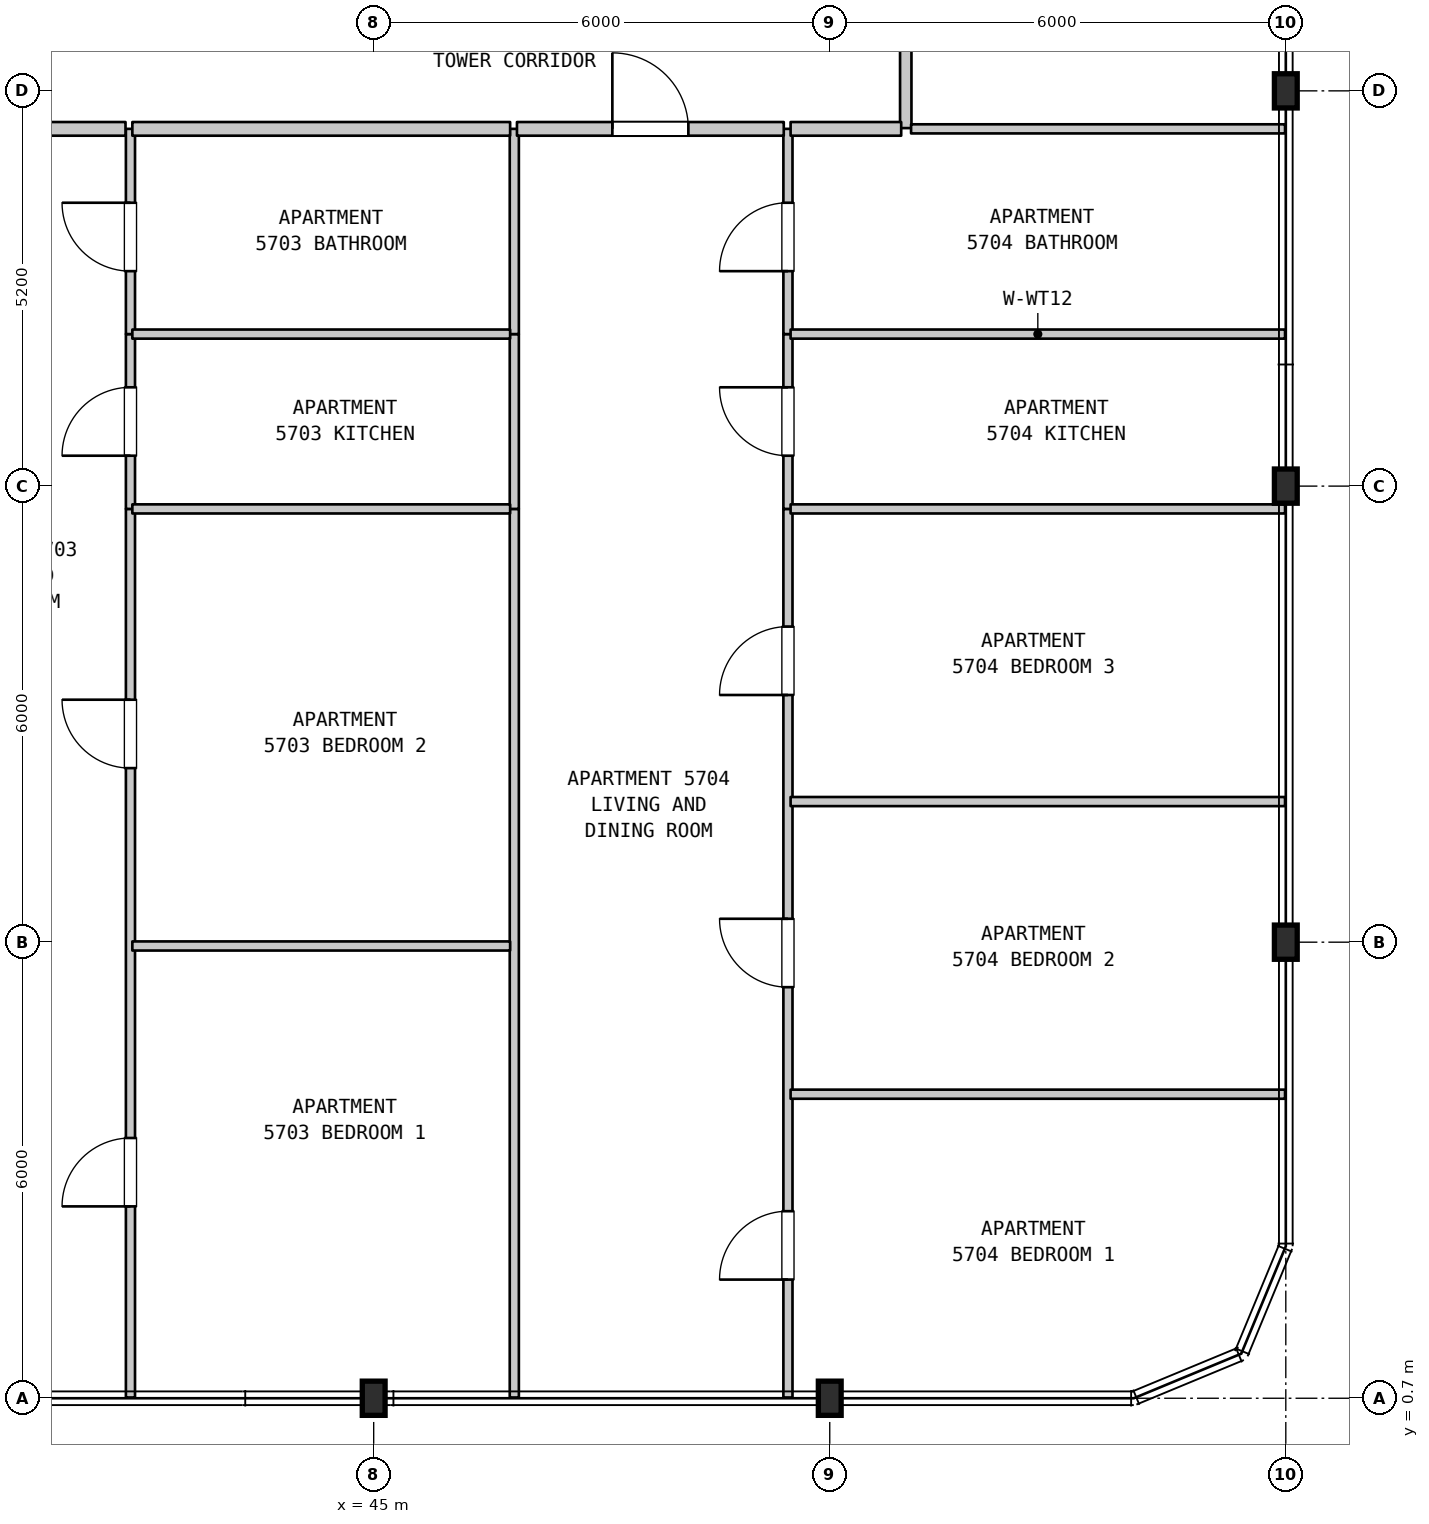
"""IFC4 building model, lengths in metres.
Left out: names, types, materials, properties, quantities, classifications, styles, units other than length and angle.
Written with IfcOpenShell. Run it as: python <this file> out.ifc"""

import sys

from ifc_helpers import new_model, si_unit, direction, frame, frame_2d, origin, origin_2d, place, context, subcontext, project, spatial, rectangle, i_section, extrude, element, fill, save


model = new_model("IFC4")
c1 = context("Model", 3, precision=1e-05, world=origin(), true_north=direction((0.0, 1.0)))
c2 = subcontext(c1, "Body", "Model", "MODEL_VIEW")
j1 = project(units=[si_unit("LENGTHUNIT", "METRE"), si_unit("PLANEANGLEUNIT", "RADIAN")], contexts=[c1])
p1 = place(None, origin())
s1 = spatial("IfcSite", under=j1, at=p1, CompositionType="ELEMENT")
p2 = place(p1, origin())
s2 = spatial("IfcBuilding", under=s1, at=p2, CompositionType="ELEMENT")
p3 = place(p2, frame((0.0, 0.0, 230.2)))
s3 = spatial("IfcBuildingStorey", under=s2, at=p3, CompositionType="ELEMENT", Elevation=230.2)
for number, where, z_axis, x_axis in (
    (1, (45.0, 0.7, 0.0), (0.0, 0.0, 1.0), (1.0, 0.0, 0.0)),
    (2, (51.0, 0.7, 0.0), (0.0, 0.0, 1.0), (1.0, 0.0, 0.0)),
    (3, (57.0, 6.7, 0.0), (0.0, 0.0, 1.0), (1.0, 0.0, 0.0)),
    (4, (57.0, 12.7, 0.0), (0.0, 0.0, 1.0), (1.0, 0.0, 0.0)),
    (5, (57.0, 17.9, 0.0), (0.0, 0.0, 1.0), (1.0, 0.0, 0.0)),
):
    element("IfcColumn", number, at=place(p3, frame(where, z_axis=z_axis, x_axis=x_axis)), inside=s3, PredefinedType="COLUMN", context=c2, shape_type="SweptSolid", body=[
        extrude(i_section(OverallWidth=0.3, OverallDepth=0.45, WebThickness=0.014, FlangeThickness=0.026, FilletRadius=0.027, at=origin_2d()), origin(), (0.0, 0.0, 1.0), 3.7),
    ])
p4 = place(p3, frame((41.8, 0.71, 0.0), z_axis=(0.0, 0.0, 1.0), x_axis=(0.0, 1.0, 0.0)))
e6 = element("IfcWall", 6, at=p4, inside=s3, PredefinedType="PARTITIONING", context=c2, shape_type="SweptSolid", body=[
    extrude(rectangle(XDim=11.69, YDim=0.12, at=frame_2d((5.845, 0.0))), origin(), (0.0, 0.0, 1.0), 3.39),
])
p5 = place(p4, frame((2.514, 0.0, 0.0)))
e7 = element("IfcOpeningElement", 7, at=p5, cuts=e6, PredefinedType="OPENING", context=c2, shape_type="SweptSolid", body=[
    extrude(rectangle(XDim=0.9, YDim=2.15, at=frame_2d((0.45, 1.075))), frame((0.0, 0.07, 0.0), z_axis=(0.0, -1.0, 0.0), x_axis=(1.0, 0.0, 0.0)), (0.0, 0.0, 1.0), 0.14),
])
p6 = place(p4, frame((8.28, 0.0, 0.0)))
e8 = element("IfcOpeningElement", 8, at=p6, cuts=e6, PredefinedType="OPENING", context=c2, shape_type="SweptSolid", body=[
    extrude(rectangle(XDim=0.9, YDim=2.15, at=frame_2d((0.45, 1.075))), frame((0.0, 0.07, 0.0), z_axis=(0.0, -1.0, 0.0), x_axis=(1.0, 0.0, 0.0)), (0.0, 0.0, 1.0), 0.14),
])
p7 = place(p3, frame((41.8, 12.4, 0.0), z_axis=(0.0, 0.0, 1.0), x_axis=(0.0, 1.0, 0.0)))
e9 = element("IfcWall", 9, at=p7, inside=s3, PredefinedType="PARTITIONING", context=c2, shape_type="SweptSolid", body=[
    extrude(rectangle(XDim=2.3, YDim=0.12, at=frame_2d((1.15, 0.0))), origin(), (0.0, 0.0, 1.0), 3.39),
])
p8 = place(p7, frame((0.7, 0.0, 0.0)))
e10 = element("IfcOpeningElement", 10, at=p8, cuts=e9, PredefinedType="OPENING", context=c2, shape_type="SweptSolid", body=[
    extrude(rectangle(XDim=0.9, YDim=2.15, at=frame_2d((0.45, 1.075))), frame((0.0, 0.07, 0.0), z_axis=(0.0, -1.0, 0.0), x_axis=(1.0, 0.0, 0.0)), (0.0, 0.0, 1.0), 0.14),
])
p9 = place(p3, frame((41.8, 14.7, 0.0), z_axis=(0.0, 0.0, 1.0), x_axis=(0.0, 1.0, 0.0)))
e11 = element("IfcWall", 11, at=p9, inside=s3, PredefinedType="PARTITIONING", context=c2, shape_type="SweptSolid", body=[
    extrude(rectangle(XDim=2.7, YDim=0.12, at=frame_2d((1.35, 0.0))), origin(), (0.0, 0.0, 1.0), 3.39),
])
p10 = place(p9, frame((0.828, 0.0, 0.0)))
e12 = element("IfcOpeningElement", 12, at=p10, cuts=e11, PredefinedType="OPENING", context=c2, shape_type="SweptSolid", body=[
    extrude(rectangle(XDim=0.9, YDim=2.1, at=frame_2d((0.45, 1.05))), frame((0.0, 0.07, 0.0), z_axis=(0.0, -1.0, 0.0), x_axis=(1.0, 0.0, 0.0)), (0.0, 0.0, 1.0), 0.14),
])
p11 = place(p3, frame((46.85, 0.71, 0.0), z_axis=(0.0, 0.0, 1.0), x_axis=(0.0, 1.0, 0.0)))
e13 = element("IfcWall", 13, at=p11, inside=s3, PredefinedType="PARTITIONING", context=c2, shape_type="SweptSolid", body=[
    extrude(rectangle(XDim=11.69, YDim=0.12, at=frame_2d((5.845, 0.0))), origin(), (0.0, 0.0, 1.0), 3.39),
])
p12 = place(p3, frame((46.85, 12.4, 0.0), z_axis=(0.0, 0.0, 1.0), x_axis=(0.0, 1.0, 0.0)))
e14 = element("IfcWall", 14, at=p12, inside=s3, PredefinedType="PARTITIONING", context=c2, shape_type="SweptSolid", body=[
    extrude(rectangle(XDim=2.3, YDim=0.12, at=frame_2d((1.15, 0.0))), origin(), (0.0, 0.0, 1.0), 3.39),
])
p13 = place(p3, frame((46.85, 14.7, 0.0), z_axis=(0.0, 0.0, 1.0), x_axis=(0.0, 1.0, 0.0)))
e15 = element("IfcWall", 15, at=p13, inside=s3, PredefinedType="PARTITIONING", context=c2, shape_type="SweptSolid", body=[
    extrude(rectangle(XDim=2.7, YDim=0.12, at=frame_2d((1.35, 0.0))), origin(), (0.0, 0.0, 1.0), 3.39),
])
p14 = place(p3, frame((50.45, 0.71, 0.0), z_axis=(0.0, 0.0, 1.0), x_axis=(0.0, 1.0, 0.0)))
e16 = element("IfcWall", 16, at=p14, inside=s3, PredefinedType="PARTITIONING", context=c2, shape_type="SweptSolid", body=[
    extrude(rectangle(XDim=11.69, YDim=0.12, at=frame_2d((5.845, 0.0))), origin(), (0.0, 0.0, 1.0), 3.39),
])
p15 = place(p14, frame((1.551, 0.0, 0.0)))
e17 = element("IfcOpeningElement", 17, at=p15, cuts=e16, PredefinedType="OPENING", context=c2, shape_type="SweptSolid", body=[
    extrude(rectangle(XDim=0.9, YDim=2.15, at=frame_2d((0.45, 1.075))), frame((0.0, 0.07, 0.0), z_axis=(0.0, -1.0, 0.0), x_axis=(1.0, 0.0, 0.0)), (0.0, 0.0, 1.0), 0.14),
])
p16 = place(p14, frame((5.398, 0.0, 0.0)))
e18 = element("IfcOpeningElement", 18, at=p16, cuts=e16, PredefinedType="OPENING", context=c2, shape_type="SweptSolid", body=[
    extrude(rectangle(XDim=0.9, YDim=2.15, at=frame_2d((0.45, 1.075))), frame((0.0, 0.07, 0.0), z_axis=(0.0, -1.0, 0.0), x_axis=(1.0, 0.0, 0.0)), (0.0, 0.0, 1.0), 0.14),
])
p17 = place(p14, frame((9.242, 0.0, 0.0)))
e19 = element("IfcOpeningElement", 19, at=p17, cuts=e16, PredefinedType="OPENING", context=c2, shape_type="SweptSolid", body=[
    extrude(rectangle(XDim=0.9, YDim=2.15, at=frame_2d((0.45, 1.075))), frame((0.0, 0.07, 0.0), z_axis=(0.0, -1.0, 0.0), x_axis=(1.0, 0.0, 0.0)), (0.0, 0.0, 1.0), 0.14),
])
p18 = place(p3, frame((50.45, 12.4, 0.0), z_axis=(0.0, 0.0, 1.0), x_axis=(0.0, 1.0, 0.0)))
e20 = element("IfcWall", 20, at=p18, inside=s3, PredefinedType="PARTITIONING", context=c2, shape_type="SweptSolid", body=[
    extrude(rectangle(XDim=2.3, YDim=0.12, at=frame_2d((1.15, 0.0))), origin(), (0.0, 0.0, 1.0), 3.39),
])
p19 = place(p18, frame((0.7, 0.0, 0.0)))
e21 = element("IfcOpeningElement", 21, at=p19, cuts=e20, PredefinedType="OPENING", context=c2, shape_type="SweptSolid", body=[
    extrude(rectangle(XDim=0.9, YDim=2.15, at=frame_2d((0.45, 1.075))), frame((0.0, 0.07, 0.0), z_axis=(0.0, -1.0, 0.0), x_axis=(1.0, 0.0, 0.0)), (0.0, 0.0, 1.0), 0.14),
])
p20 = place(p3, frame((50.45, 14.7, 0.0), z_axis=(0.0, 0.0, 1.0), x_axis=(0.0, 1.0, 0.0)))
e22 = element("IfcWall", 22, at=p20, inside=s3, PredefinedType="PARTITIONING", context=c2, shape_type="SweptSolid", body=[
    extrude(rectangle(XDim=2.7, YDim=0.12, at=frame_2d((1.35, 0.0))), origin(), (0.0, 0.0, 1.0), 3.39),
])
p21 = place(p20, frame((0.828, 0.0, 0.0)))
e23 = element("IfcOpeningElement", 23, at=p21, cuts=e22, PredefinedType="OPENING", context=c2, shape_type="SweptSolid", body=[
    extrude(rectangle(XDim=0.9, YDim=2.1, at=frame_2d((0.45, 1.05))), frame((0.0, 0.07, 0.0), z_axis=(0.0, -1.0, 0.0), x_axis=(1.0, 0.0, 0.0)), (0.0, 0.0, 1.0), 0.14),
])
p22 = place(p3, frame((52.0, 17.41, 0.0), z_axis=(0.0, 0.0, 1.0), x_axis=(0.0, 1.0, 0.0)))
e24 = element("IfcWall", 24, at=p22, inside=s3, PredefinedType="STANDARD", context=c2, shape_type="SweptSolid", body=[
    extrude(rectangle(XDim=2.09, YDim=0.15, at=frame_2d((1.045, 0.0))), origin(), (0.0, 0.0, 1.0), 3.39),
])
p23 = place(p3, frame((50.485, 4.7, 0.0), z_axis=(0.0, 0.0, 1.0), x_axis=(1.0, 0.0, 0.0)))
e25 = element("IfcWall", 25, at=p23, inside=s3, PredefinedType="PARTITIONING", context=c2, shape_type="SweptSolid", body=[
    extrude(rectangle(XDim=6.505, YDim=0.12, at=frame_2d((3.252, 0.0))), origin(), (0.0, 0.0, 1.0), 3.39),
])
p24 = place(p3, frame((41.825, 6.65, 0.0), z_axis=(0.0, 0.0, 1.0), x_axis=(1.0, 0.0, 0.0)))
e26 = element("IfcWall", 26, at=p24, inside=s3, PredefinedType="PARTITIONING", context=c2, shape_type="SweptSolid", body=[
    extrude(rectangle(XDim=4.97, YDim=0.12, at=frame_2d((2.485, 0.0))), origin(), (0.0, 0.0, 1.0), 2.79),
])
p25 = place(p3, frame((50.485, 8.55, 0.0), z_axis=(0.0, 0.0, 1.0), x_axis=(1.0, 0.0, 0.0)))
e27 = element("IfcWall", 27, at=p25, inside=s3, PredefinedType="PARTITIONING", context=c2, shape_type="SweptSolid", body=[
    extrude(rectangle(XDim=6.505, YDim=0.12, at=frame_2d((3.252, 0.0))), origin(), (0.0, 0.0, 1.0), 3.39),
])
p26 = place(p3, frame((41.825, 12.4, 0.0), z_axis=(0.0, 0.0, 1.0), x_axis=(1.0, 0.0, 0.0)))
e28 = element("IfcWall", 28, at=p26, inside=s3, PredefinedType="PARTITIONING", context=c2, shape_type="SweptSolid", body=[
    extrude(rectangle(XDim=4.97, YDim=0.12, at=frame_2d((2.485, 0.0))), origin(), (0.0, 0.0, 1.0), 3.39),
])
p27 = place(p3, frame((50.485, 12.4, 0.0), z_axis=(0.0, 0.0, 1.0), x_axis=(1.0, 0.0, 0.0)))
e29 = element("IfcWall", 29, at=p27, inside=s3, PredefinedType="PARTITIONING", context=c2, shape_type="SweptSolid", body=[
    extrude(rectangle(XDim=6.505, YDim=0.12, at=frame_2d((3.252, 0.0))), origin(), (0.0, 0.0, 1.0), 3.39),
])
p28 = place(p3, frame((41.825, 14.7, 0.0), z_axis=(0.0, 0.0, 1.0), x_axis=(1.0, 0.0, 0.0)))
e30 = element("IfcWall", 30, at=p28, inside=s3, PredefinedType="PARTITIONING", context=c2, shape_type="SweptSolid", body=[
    extrude(rectangle(XDim=4.97, YDim=0.12, at=frame_2d((2.485, 0.0))), origin(), (0.0, 0.0, 1.0), 3.39),
])
p29 = place(p3, frame((50.485, 14.7, 0.0), z_axis=(0.0, 0.0, 1.0), x_axis=(1.0, 0.0, 0.0)))
e31 = element("IfcWall", 31, at=p29, inside=s3, PredefinedType="PARTITIONING", context=c2, shape_type="SweptSolid", body=[
    extrude(rectangle(XDim=6.505, YDim=0.12, at=frame_2d((3.252, 0.0))), origin(), (0.0, 0.0, 1.0), 3.39),
])
p30 = place(p3, frame((38.225, 17.4, 0.0), z_axis=(0.0, 0.0, 1.0), x_axis=(1.0, 0.0, 0.0)))
e32 = element("IfcWall", 32, at=p30, inside=s3, PredefinedType="STANDARD", context=c2, shape_type="SweptSolid", body=[
    extrude(rectangle(XDim=3.51, YDim=0.18, at=frame_2d((1.755, 0.0))), origin(), (0.0, 0.0, 1.0), 3.39),
])
p31 = place(p30, frame((1.185, 0.0, 0.0)))
e33 = element("IfcOpeningElement", 33, at=p31, cuts=e32, PredefinedType="OPENING", context=c2, shape_type="SweptSolid", body=[
    extrude(rectangle(XDim=1.0, YDim=2.15, at=frame_2d((0.5, 1.075))), frame((0.0, 0.1, 0.0), z_axis=(0.0, -1.0, 0.0), x_axis=(1.0, 0.0, 0.0)), (0.0, 0.0, 1.0), 0.2),
])
p32 = place(p3, frame((41.825, 17.4, 0.0), z_axis=(0.0, 0.0, 1.0), x_axis=(1.0, 0.0, 0.0)))
e34 = element("IfcWall", 34, at=p32, inside=s3, PredefinedType="STANDARD", context=c2, shape_type="SweptSolid", body=[
    extrude(rectangle(XDim=4.97, YDim=0.18, at=frame_2d((2.485, 0.0))), origin(), (0.0, 0.0, 1.0), 3.39),
])
p33 = place(p3, frame((46.885, 17.4, 0.0), z_axis=(0.0, 0.0, 1.0), x_axis=(1.0, 0.0, 0.0)))
e35 = element("IfcWall", 35, at=p33, inside=s3, PredefinedType="STANDARD", context=c2, shape_type="SweptSolid", body=[
    extrude(rectangle(XDim=3.51, YDim=0.18, at=frame_2d((1.755, 0.0))), origin(), (0.0, 0.0, 1.0), 3.39),
])
p34 = place(p33, frame((1.255, 0.0, 0.0)))
e36 = element("IfcOpeningElement", 36, at=p34, cuts=e35, PredefinedType="OPENING", context=c2, shape_type="SweptSolid", body=[
    extrude(rectangle(XDim=1.0, YDim=2.15, at=frame_2d((0.5, 1.075))), frame((0.0, 0.1, 0.0), z_axis=(0.0, -1.0, 0.0), x_axis=(1.0, 0.0, 0.0)), (0.0, 0.0, 1.0), 0.2),
])
p35 = place(p3, frame((50.485, 17.4, 0.0), z_axis=(0.0, 0.0, 1.0), x_axis=(1.0, 0.0, 0.0)))
e37 = element("IfcWall", 37, at=p35, inside=s3, PredefinedType="STANDARD", context=c2, shape_type="SweptSolid", body=[
    extrude(rectangle(XDim=1.455, YDim=0.18, at=frame_2d((0.728, 0.0))), origin(), (0.0, 0.0, 1.0), 3.39),
])
p36 = place(p3, frame((52.07, 17.4, 0.0), z_axis=(0.0, 0.0, 1.0), x_axis=(1.0, 0.0, 0.0)))
e38 = element("IfcWall", 38, at=p36, inside=s3, PredefinedType="PARTITIONING", context=c2, shape_type="SweptSolid", body=[
    extrude(rectangle(XDim=4.92, YDim=0.12, at=frame_2d((2.46, 0.0))), origin(), (0.0, 0.0, 1.0), 3.39),
])
p37 = place(p5, origin())
e39 = element("IfcDoor", 39, at=p37, inside=s3, OperationType="SINGLE_SWING_LEFT", PredefinedType="DOOR", context=c2, shape_type="SweptSolid", body=[
    extrude(rectangle(XDim=0.9, YDim=2.15, at=frame_2d((0.45, 1.075))), frame((0.0, 0.025, 0.0), z_axis=(0.0, -1.0, 0.0), x_axis=(1.0, 0.0, 0.0)), (0.0, 0.0, 1.0), 0.05),
])
fill(e7, e39)
p38 = place(p6, origin())
e40 = element("IfcDoor", 40, at=p38, inside=s3, OperationType="SINGLE_SWING_RIGHT", PredefinedType="DOOR", context=c2, shape_type="SweptSolid", body=[
    extrude(rectangle(XDim=0.9, YDim=2.15, at=frame_2d((0.45, 1.075))), frame((0.0, 0.025, 0.0), z_axis=(0.0, -1.0, 0.0), x_axis=(1.0, 0.0, 0.0)), (0.0, 0.0, 1.0), 0.05),
])
fill(e8, e40)
p39 = place(p8, origin())
e41 = element("IfcDoor", 41, at=p39, inside=s3, OperationType="SINGLE_SWING_LEFT", PredefinedType="DOOR", context=c2, shape_type="SweptSolid", body=[
    extrude(rectangle(XDim=0.9, YDim=2.15, at=frame_2d((0.45, 1.075))), frame((0.0, 0.025, 0.0), z_axis=(0.0, -1.0, 0.0), x_axis=(1.0, 0.0, 0.0)), (0.0, 0.0, 1.0), 0.05),
])
fill(e10, e41)
p40 = place(p10, origin())
e42 = element("IfcDoor", 42, at=p40, inside=s3, OperationType="SINGLE_SWING_RIGHT", PredefinedType="DOOR", context=c2, shape_type="SweptSolid", body=[
    extrude(rectangle(XDim=0.9, YDim=2.1, at=frame_2d((0.45, 1.05))), frame((0.0, 0.025, 0.0), z_axis=(0.0, -1.0, 0.0), x_axis=(1.0, 0.0, 0.0)), (0.0, 0.0, 1.0), 0.05),
])
fill(e12, e42)
p41 = place(p15, origin())
e43 = element("IfcDoor", 43, at=p41, inside=s3, OperationType="SINGLE_SWING_LEFT", PredefinedType="DOOR", context=c2, shape_type="SweptSolid", body=[
    extrude(rectangle(XDim=0.9, YDim=2.15, at=frame_2d((0.45, 1.075))), frame((0.0, 0.025, 0.0), z_axis=(0.0, -1.0, 0.0), x_axis=(1.0, 0.0, 0.0)), (0.0, 0.0, 1.0), 0.05),
])
fill(e17, e43)
p42 = place(p16, origin())
e44 = element("IfcDoor", 44, at=p42, inside=s3, OperationType="SINGLE_SWING_RIGHT", PredefinedType="DOOR", context=c2, shape_type="SweptSolid", body=[
    extrude(rectangle(XDim=0.9, YDim=2.15, at=frame_2d((0.45, 1.075))), frame((0.0, 0.025, 0.0), z_axis=(0.0, -1.0, 0.0), x_axis=(1.0, 0.0, 0.0)), (0.0, 0.0, 1.0), 0.05),
])
fill(e18, e44)
p43 = place(p17, origin())
e45 = element("IfcDoor", 45, at=p43, inside=s3, OperationType="SINGLE_SWING_LEFT", PredefinedType="DOOR", context=c2, shape_type="SweptSolid", body=[
    extrude(rectangle(XDim=0.9, YDim=2.15, at=frame_2d((0.45, 1.075))), frame((0.0, 0.025, 0.0), z_axis=(0.0, -1.0, 0.0), x_axis=(1.0, 0.0, 0.0)), (0.0, 0.0, 1.0), 0.05),
])
fill(e19, e45)
p44 = place(p19, origin())
e46 = element("IfcDoor", 46, at=p44, inside=s3, OperationType="SINGLE_SWING_RIGHT", PredefinedType="DOOR", context=c2, shape_type="SweptSolid", body=[
    extrude(rectangle(XDim=0.9, YDim=2.15, at=frame_2d((0.45, 1.075))), frame((0.0, 0.025, 0.0), z_axis=(0.0, -1.0, 0.0), x_axis=(1.0, 0.0, 0.0)), (0.0, 0.0, 1.0), 0.05),
])
fill(e21, e46)
p45 = place(p21, origin())
e47 = element("IfcDoor", 47, at=p45, inside=s3, OperationType="SINGLE_SWING_LEFT", PredefinedType="DOOR", context=c2, shape_type="SweptSolid", body=[
    extrude(rectangle(XDim=0.9, YDim=2.1, at=frame_2d((0.45, 1.05))), frame((0.0, 0.025, 0.0), z_axis=(0.0, -1.0, 0.0), x_axis=(1.0, 0.0, 0.0)), (0.0, 0.0, 1.0), 0.05),
])
fill(e23, e47)
p46 = place(p34, origin())
e48 = element("IfcDoor", 48, at=p46, inside=s3, OperationType="SINGLE_SWING_LEFT", PredefinedType="DOOR", context=c2, shape_type="SweptSolid", body=[
    extrude(rectangle(XDim=1.0, YDim=2.15, at=frame_2d((0.5, 1.075))), frame((0.0, 0.025, 0.0), z_axis=(0.0, -1.0, 0.0), x_axis=(1.0, 0.0, 0.0)), (0.0, 0.0, 1.0), 0.05),
])
fill(e36, e48)
save(model, sys.argv[1])
